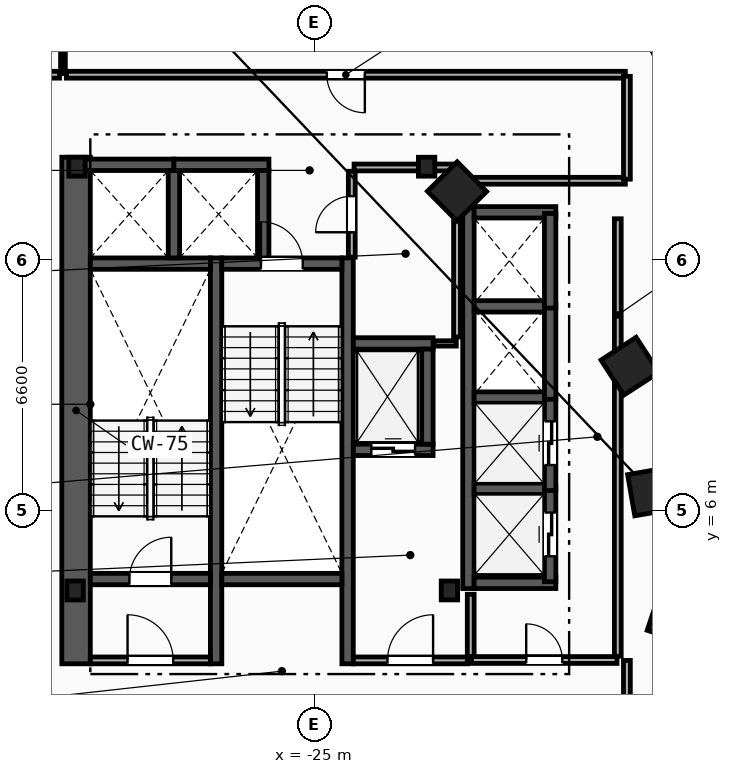
"""IFC4 building model, lengths in metres.
Left out: names, types, materials, properties, quantities, classifications, styles, units other than length and angle.
Written with IfcOpenShell. Run it as: python <this file> out.ifc"""

import sys

from ifc_helpers import new_model, si_unit, direction, frame, frame_2d, origin, origin_2d, place, context, subcontext, project, spatial, rectangle, i_section, extrude, element, fill, save


model = new_model("IFC4")
c1 = context("Model", 3, precision=1e-05, world=origin(), true_north=direction((0.0, 1.0)))
c2 = subcontext(c1, "Body", "Model", "MODEL_VIEW")
j1 = project(units=[si_unit("LENGTHUNIT", "METRE"), si_unit("PLANEANGLEUNIT", "RADIAN")], contexts=[c1])
p1 = place(None, origin())
s1 = spatial("IfcSite", under=j1, at=p1, CompositionType="ELEMENT")
p2 = place(p1, origin())
s2 = spatial("IfcBuilding", under=s1, at=p2, CompositionType="ELEMENT")
p3 = place(p2, frame((0.0, 0.0, 125.0)))
s3 = spatial("IfcBuildingStorey", under=s2, at=p3, CompositionType="ELEMENT", Elevation=125.0)
for number, where, z_axis, x_axis in (
    (1, (-31.3, 3.9, 0.0), (0.0, 0.0, 1.0), (1.0, 0.0, 0.0)),
    (2, (-21.45, 3.9, 0.0), (0.0, 0.0, 1.0), (1.0, 0.0, 0.0)),
    (3, (-22.05, 15.05, 0.0), (0.0, 0.0, 1.0), (1.0, 0.0, 0.0)),
    (4, (-31.25, 15.05, 0.0), (0.0, 0.0, 1.0), (1.0, 0.0, 0.0)),
):
    element("IfcColumn", number, at=place(p3, frame(where, z_axis=z_axis, x_axis=x_axis)), inside=s3, PredefinedType="COLUMN", context=c2, shape_type="SweptSolid", body=[
        extrude(i_section(OverallWidth=0.432, OverallDepth=0.498, WebThickness=0.056, FlangeThickness=0.089, FilletRadius=0.018, at=origin_2d()), origin(), (0.0, 0.0, 1.0), 3.6),
    ])
for number, where, z_axis, x_axis in (
    (5, (-15.55, 3.2, 0.0), (0.0, 0.0, 1.0), (0.315, 0.949, 0.0)),
    (6, (-16.125, 6.5, 0.0), (0.0, 0.0, 1.0), (-0.172, 0.985, 0.0)),
    (7, (-16.7, 9.8, 0.0), (0.0, 0.0, 1.0), (-0.544, 0.839, 0.0)),
    (8, (-21.25, 14.4, 0.0), (0.0, 0.0, 1.0), (-0.703, 0.711, 0.0)),
):
    element("IfcColumn", number, at=place(p3, frame(where, z_axis=z_axis, x_axis=x_axis)), inside=s3, PredefinedType="COLUMN", context=c2, shape_type="SweptSolid", body=[
        extrude(rectangle(XDim=1.1, YDim=1.1, at=origin_2d()), origin(), (0.0, 0.0, 1.0), 3.6),
    ])
p4 = place(p3, frame((-31.275, 1.97, 0.0), z_axis=(0.0, 0.0, 1.0), x_axis=(0.0, 1.0, 0.0)))
e9 = element("IfcWall", 9, at=p4, inside=s3, PredefinedType="SHEAR", context=c2, shape_type="SweptSolid", body=[
    extrude(rectangle(XDim=13.33, YDim=0.75, at=frame_2d((6.665, 0.0))), origin(), (0.0, 0.0, 1.0), 3.3),
])
for number, where, z_axis, x_axis in (
    (10, (-27.59, 1.97, 0.0), (0.0, 0.0, 1.0), (0.0, 1.0, 0.0)),
    (11, (-24.13, 1.97, 0.0), (0.0, 0.0, 1.0), (0.0, 1.0, 0.0)),
):
    element("IfcWall", number, at=place(p3, frame(where, z_axis=z_axis, x_axis=x_axis)), inside=s3, PredefinedType="SHEAR", context=c2, shape_type="SweptSolid", body=[
        extrude(rectangle(XDim=10.68, YDim=0.3, at=frame_2d((5.34, 0.0))), origin(), (0.0, 0.0, 1.0), 3.3),
    ])
p5 = place(p3, frame((-30.9, 4.2, 0.0), z_axis=(0.0, 0.0, 1.0), x_axis=(1.0, 0.0, 0.0)))
e12 = element("IfcWall", 12, at=p5, inside=s3, PredefinedType="SHEAR", context=c2, shape_type="SweptSolid", body=[
    extrude(rectangle(XDim=3.16, YDim=0.3, at=frame_2d((1.58, 0.0))), origin(), (0.0, 0.0, 1.0), 3.3),
])
p6 = place(p5, frame((1.03, 0.0, 0.0)))
e13 = element("IfcOpeningElement", 13, at=p6, cuts=e12, PredefinedType="OPENING", context=c2, shape_type="SweptSolid", body=[
    extrude(rectangle(XDim=1.1, YDim=2.15, at=frame_2d((0.55, 1.075))), frame((0.0, 0.16, 0.0), z_axis=(0.0, -1.0, 0.0), x_axis=(1.0, 0.0, 0.0)), (0.0, 0.0, 1.0), 0.32),
])
p7 = place(p3, frame((-30.9, 12.5, 0.0), z_axis=(0.0, 0.0, 1.0), x_axis=(1.0, 0.0, 0.0)))
e14 = element("IfcWall", 14, at=p7, inside=s3, PredefinedType="SHEAR", context=c2, shape_type="SweptSolid", body=[
    extrude(rectangle(XDim=3.16, YDim=0.3, at=frame_2d((1.58, 0.0))), origin(), (0.0, 0.0, 1.0), 3.3),
])
p8 = place(p3, frame((-27.44, 12.5, 0.0), z_axis=(0.0, 0.0, 1.0), x_axis=(1.0, 0.0, 0.0)))
e15 = element("IfcWall", 15, at=p8, inside=s3, PredefinedType="SHEAR", context=c2, shape_type="SweptSolid", body=[
    extrude(rectangle(XDim=3.16, YDim=0.3, at=frame_2d((1.58, 0.0))), origin(), (0.0, 0.0, 1.0), 3.3),
])
p9 = place(p8, frame((1.03, 0.0, 0.0)))
e16 = element("IfcOpeningElement", 16, at=p9, cuts=e15, PredefinedType="OPENING", context=c2, shape_type="SweptSolid", body=[
    extrude(rectangle(XDim=1.1, YDim=2.15, at=frame_2d((0.55, 1.075))), frame((0.0, 0.16, 0.0), z_axis=(0.0, -1.0, 0.0), x_axis=(1.0, 0.0, 0.0)), (0.0, 0.0, 1.0), 0.32),
])
p10 = place(p3, frame((-27.44, 4.2, 0.0), z_axis=(0.0, 0.0, 1.0), x_axis=(1.0, 0.0, 0.0)))
e17 = element("IfcWall", 17, at=p10, inside=s3, PredefinedType="SHEAR", context=c2, shape_type="SweptSolid", body=[
    extrude(rectangle(XDim=3.16, YDim=0.3, at=frame_2d((1.58, 0.0))), origin(), (0.0, 0.0, 1.0), 3.3),
])
p11 = place(p3, frame((-20.89, 2.15, 0.0), z_axis=(0.0, 0.0, 1.0), x_axis=(0.0, 1.0, 0.0)))
e18 = element("IfcWall", 18, at=p11, inside=s3, PredefinedType="PARTITIONING", context=c2, shape_type="SweptSolid", body=[
    extrude(rectangle(XDim=1.65, YDim=0.18, at=frame_2d((0.825, 0.0))), origin(), (0.0, 0.0, 1.0), 3.3),
])
p12 = place(p3, frame((-23.98, 2.06, 0.0), z_axis=(0.0, 0.0, 1.0), x_axis=(1.0, 0.0, 0.0)))
e19 = element("IfcWall", 19, at=p12, inside=s3, PredefinedType="PARTITIONING", context=c2, shape_type="SweptSolid", body=[
    extrude(rectangle(XDim=3.0, YDim=0.18, at=frame_2d((1.5, 0.0))), origin(), (0.0, 0.0, 1.0), 3.3),
])
p13 = place(p12, frame((0.9, 0.0, 0.0)))
e20 = element("IfcOpeningElement", 20, at=p13, cuts=e19, PredefinedType="OPENING", context=c2, shape_type="SweptSolid", body=[
    extrude(rectangle(XDim=1.2, YDim=2.15, at=frame_2d((0.6, 1.075))), frame((0.0, 0.1, 0.0), z_axis=(0.0, -1.0, 0.0), x_axis=(1.0, 0.0, 0.0)), (0.0, 0.0, 1.0), 0.2),
])
p14 = place(p3, frame((-30.9, 2.06, 0.0), z_axis=(0.0, 0.0, 1.0), x_axis=(1.0, 0.0, 0.0)))
e21 = element("IfcWall", 21, at=p14, inside=s3, PredefinedType="PARTITIONING", context=c2, shape_type="SweptSolid", body=[
    extrude(rectangle(XDim=3.16, YDim=0.18, at=frame_2d((1.58, 0.0))), origin(), (0.0, 0.0, 1.0), 3.3),
])
p15 = place(p14, frame((0.98, 0.0, 0.0)))
e22 = element("IfcOpeningElement", 22, at=p15, cuts=e21, PredefinedType="OPENING", context=c2, shape_type="SweptSolid", body=[
    extrude(rectangle(XDim=1.2, YDim=2.15, at=frame_2d((0.6, 1.075))), frame((0.0, 0.1, 0.0), z_axis=(0.0, -1.0, 0.0), x_axis=(1.0, 0.0, 0.0)), (0.0, 0.0, 1.0), 0.2),
])
p16 = place(p3, frame((-23.98, 7.6, 0.0), z_axis=(0.0, 0.0, 1.0), x_axis=(1.0, 0.0, 0.0)))
e23 = element("IfcWall", 23, at=p16, inside=s3, PredefinedType="SHEAR", context=c2, shape_type="SweptSolid", body=[
    extrude(rectangle(XDim=2.1, YDim=0.3, at=frame_2d((1.05, 0.0))), origin(), (0.0, 0.0, 1.0), 3.3),
])
p17 = place(p16, frame((0.475, 0.0, 0.0)))
e24 = element("IfcOpeningElement", 24, at=p17, cuts=e23, PredefinedType="OPENING", context=c2, shape_type="SweptSolid", body=[
    extrude(rectangle(XDim=1.15, YDim=2.2, at=frame_2d((0.575, 1.1))), frame((0.0, 0.16, 0.0), z_axis=(0.0, -1.0, 0.0), x_axis=(1.0, 0.0, 0.0)), (0.0, 0.0, 1.0), 0.32),
])
p18 = place(p3, frame((-23.98, 10.4, 0.0), z_axis=(0.0, 0.0, 1.0), x_axis=(1.0, 0.0, 0.0)))
e25 = element("IfcWall", 25, at=p18, inside=s3, PredefinedType="SHEAR", context=c2, shape_type="SweptSolid", body=[
    extrude(rectangle(XDim=2.1, YDim=0.3, at=frame_2d((1.05, 0.0))), origin(), (0.0, 0.0, 1.0), 3.3),
])
for number, where, z_axis, x_axis in (
    (26, (-22.03, 7.75, 0.0), (0.0, 0.0, 1.0), (0.0, 1.0, 0.0)),
    (27, (-31.2, 15.1, 0.0), (0.0, 0.0, 1.0), (1.0, 0.0, 0.0)),
):
    element("IfcWall", number, at=place(p3, frame(where, z_axis=z_axis, x_axis=x_axis)), inside=s3, PredefinedType="SHEAR", context=c2, shape_type="SweptSolid", body=[
        extrude(rectangle(XDim=2.5, YDim=0.3, at=frame_2d((1.25, 0.0))), origin(), (0.0, 0.0, 1.0), 3.3),
    ])
p19 = place(p3, frame((-28.7, 12.65, 0.0), z_axis=(0.0, 0.0, 1.0), x_axis=(0.0, 1.0, 0.0)))
e28 = element("IfcWall", 28, at=p19, inside=s3, PredefinedType="SHEAR", context=c2, shape_type="SweptSolid", body=[
    extrude(rectangle(XDim=2.3, YDim=0.3, at=frame_2d((1.15, 0.0))), origin(), (0.0, 0.0, 1.0), 3.3),
])
p20 = place(p3, frame((-28.7, 15.1, 0.0), z_axis=(0.0, 0.0, 1.0), x_axis=(1.0, 0.0, 0.0)))
e29 = element("IfcWall", 29, at=p20, inside=s3, PredefinedType="SHEAR", context=c2, shape_type="SweptSolid", body=[
    extrude(rectangle(XDim=2.5, YDim=0.3, at=frame_2d((1.25, 0.0))), origin(), (0.0, 0.0, 1.0), 3.3),
])
p21 = place(p3, frame((-26.35, 12.65, 0.0), z_axis=(0.0, 0.0, 1.0), x_axis=(0.0, 1.0, 0.0)))
e30 = element("IfcWall", 30, at=p21, inside=s3, PredefinedType="SHEAR", context=c2, shape_type="SweptSolid", body=[
    extrude(rectangle(XDim=2.3, YDim=0.3, at=frame_2d((1.15, 0.0))), origin(), (0.0, 0.0, 1.0), 3.3),
])
p22 = place(p3, frame((-20.95, 3.95, 0.0), z_axis=(0.0, 0.0, 1.0), x_axis=(0.0, 1.0, 0.0)))
e31 = element("IfcWall", 31, at=p22, inside=s3, PredefinedType="SHEAR", context=c2, shape_type="SweptSolid", body=[
    extrude(rectangle(XDim=10.05, YDim=0.3, at=frame_2d((5.025, 0.0))), origin(), (0.0, 0.0, 1.0), 3.3),
])
for number, where, z_axis, x_axis in (
    (32, (-20.8, 4.1, 0.0), (0.0, 0.0, 1.0), (1.0, 0.0, 0.0)),
    (33, (-20.8, 13.85, 0.0), (0.0, 0.0, 1.0), (1.0, 0.0, 0.0)),
):
    element("IfcWall", number, at=place(p3, frame(where, z_axis=z_axis, x_axis=x_axis)), inside=s3, PredefinedType="SHEAR", context=c2, shape_type="SweptSolid", body=[
        extrude(rectangle(XDim=2.15, YDim=0.3, at=frame_2d((1.075, 0.0))), origin(), (0.0, 0.0, 1.0), 3.3),
    ])
for number, where, z_axis, x_axis in (
    (34, (-20.8, 6.575, 0.0), (0.0, 0.0, 1.0), (1.0, 0.0, 0.0)),
    (35, (-20.8, 8.975, 0.0), (0.0, 0.0, 1.0), (1.0, 0.0, 0.0)),
    (36, (-20.8, 11.375, 0.0), (0.0, 0.0, 1.0), (1.0, 0.0, 0.0)),
):
    element("IfcWall", number, at=place(p3, frame(where, z_axis=z_axis, x_axis=x_axis)), inside=s3, PredefinedType="SHEAR", context=c2, shape_type="SweptSolid", body=[
        extrude(rectangle(XDim=1.85, YDim=0.3, at=frame_2d((0.925, 0.0))), origin(), (0.0, 0.0, 1.0), 3.3),
    ])
p23 = place(p3, frame((-18.8, 4.13, 0.0), z_axis=(0.0, 0.0, 1.0), x_axis=(0.0, 1.0, 0.0)))
e37 = element("IfcWall", 37, at=p23, inside=s3, PredefinedType="SHEAR", context=c2, shape_type="SweptSolid", body=[
    extrude(rectangle(XDim=2.49, YDim=0.3, at=frame_2d((1.245, 0.0))), origin(), (0.0, 0.0, 1.0), 3.3),
])
p24 = place(p23, frame((0.67, 0.0, 0.0)))
e38 = element("IfcOpeningElement", 38, at=p24, cuts=e37, PredefinedType="OPENING", context=c2, shape_type="SweptSolid", body=[
    extrude(rectangle(XDim=1.15, YDim=2.2, at=frame_2d((0.575, 1.1))), frame((0.0, 0.16, 0.0), z_axis=(0.0, -1.0, 0.0), x_axis=(1.0, 0.0, 0.0)), (0.0, 0.0, 1.0), 0.32),
])
p25 = place(p3, frame((-18.8, 6.53, 0.0), z_axis=(0.0, 0.0, 1.0), x_axis=(0.0, 1.0, 0.0)))
e39 = element("IfcWall", 39, at=p25, inside=s3, PredefinedType="SHEAR", context=c2, shape_type="SweptSolid", body=[
    extrude(rectangle(XDim=2.49, YDim=0.3, at=frame_2d((1.245, 0.0))), origin(), (0.0, 0.0, 1.0), 3.3),
])
p26 = place(p25, frame((0.67, 0.0, 0.0)))
e40 = element("IfcOpeningElement", 40, at=p26, cuts=e39, PredefinedType="OPENING", context=c2, shape_type="SweptSolid", body=[
    extrude(rectangle(XDim=1.15, YDim=2.2, at=frame_2d((0.575, 1.1))), frame((0.0, 0.16, 0.0), z_axis=(0.0, -1.0, 0.0), x_axis=(1.0, 0.0, 0.0)), (0.0, 0.0, 1.0), 0.32),
])
for number, where, z_axis, x_axis in (
    (41, (-18.8, 8.93, 0.0), (0.0, 0.0, 1.0), (0.0, 1.0, 0.0)),
    (42, (-18.8, 11.33, 0.0), (0.0, 0.0, 1.0), (0.0, 1.0, 0.0)),
):
    element("IfcWall", number, at=place(p3, frame(where, z_axis=z_axis, x_axis=x_axis)), inside=s3, PredefinedType="SHEAR", context=c2, shape_type="SweptSolid", body=[
        extrude(rectangle(XDim=2.49, YDim=0.3, at=frame_2d((1.245, 0.0))), origin(), (0.0, 0.0, 1.0), 3.3),
    ])
p27 = place(p3, frame((-17.02, 2.17, 0.0), z_axis=(0.0, 0.0, 1.0), x_axis=(0.0, 1.0, 0.0)))
e43 = element("IfcWall", 43, at=p27, inside=s3, PredefinedType="PARTITIONING", context=c2, shape_type="SweptSolid", body=[
    extrude(rectangle(XDim=11.51, YDim=0.18, at=frame_2d((5.755, 0.0))), origin(), (0.0, 0.0, 1.0), 3.3),
])
p28 = place(p3, frame((-20.87, 2.07, 0.0), z_axis=(0.0, 0.0, 1.0), x_axis=(1.0, 0.0, 0.0)))
e44 = element("IfcWall", 44, at=p28, inside=s3, PredefinedType="PARTITIONING", context=c2, shape_type="SweptSolid", body=[
    extrude(rectangle(XDim=3.83, YDim=0.18, at=frame_2d((1.915, 0.0))), origin(), (0.0, 0.0, 1.0), 3.3),
])
p29 = place(p28, frame((1.44, 0.0, 0.0)))
e45 = element("IfcOpeningElement", 45, at=p29, cuts=e44, PredefinedType="OPENING", context=c2, shape_type="SweptSolid", body=[
    extrude(rectangle(XDim=0.95, YDim=2.1, at=frame_2d((0.475, 1.05))), frame((0.0, 0.1, 0.0), z_axis=(0.0, -1.0, 0.0), x_axis=(1.0, 0.0, 0.0)), (0.0, 0.0, 1.0), 0.2),
])
p30 = place(p3, frame((-21.86, 10.4, 0.0), z_axis=(0.0, 0.0, 1.0), x_axis=(1.0, 0.0, 0.0)))
e46 = element("IfcWall", 46, at=p30, inside=s3, PredefinedType="PARTITIONING", context=c2, shape_type="SweptSolid", body=[
    extrude(rectangle(XDim=0.59, YDim=0.14, at=frame_2d((0.295, 0.0))), origin(), (0.0, 0.0, 1.0), 3.3),
])
p31 = place(p3, frame((-21.25, 10.57, 0.0), z_axis=(0.0, 0.0, 1.0), x_axis=(0.0, 1.0, 0.0)))
e47 = element("IfcWall", 47, at=p31, inside=s3, PredefinedType="PARTITIONING", context=c2, shape_type="SweptSolid", body=[
    extrude(rectangle(XDim=4.36, YDim=0.18, at=frame_2d((2.18, 0.0))), origin(), (0.0, 0.0, 1.0), 3.3),
])
p32 = place(p3, frame((-23.96, 15.03, 0.0), z_axis=(0.0, 0.0, 1.0), x_axis=(1.0, 0.0, 0.0)))
e48 = element("IfcWall", 48, at=p32, inside=s3, PredefinedType="PARTITIONING", context=c2, shape_type="SweptSolid", body=[
    extrude(rectangle(XDim=2.61, YDim=0.18, at=frame_2d((1.305, 0.0))), origin(), (0.0, 0.0, 1.0), 2.373),
])
p33 = place(p3, frame((-24.02, 12.67, 0.0), z_axis=(0.0, 0.0, 1.0), x_axis=(0.0, 1.0, 0.0)))
e49 = element("IfcWall", 49, at=p33, inside=s3, PredefinedType="PARTITIONING", context=c2, shape_type="SweptSolid", body=[
    extrude(rectangle(XDim=2.26, YDim=0.18, at=frame_2d((1.13, 0.0))), origin(), (0.0, 0.0, 1.0), 3.3),
])
p34 = place(p33, frame((0.655, 0.0, 0.0)))
e50 = element("IfcOpeningElement", 50, at=p34, cuts=e49, PredefinedType="OPENING", context=c2, shape_type="SweptSolid", body=[
    extrude(rectangle(XDim=0.95, YDim=2.1, at=frame_2d((0.475, 1.05))), frame((0.0, 0.1, 0.0), z_axis=(0.0, -1.0, 0.0), x_axis=(1.0, 0.0, 0.0)), (0.0, 0.0, 1.0), 0.2),
])
p35 = place(p3, frame((-31.62, 17.5, 0.0), z_axis=(0.0, 0.0, 1.0), x_axis=(0.0, 1.0, 0.0)))
e51 = element("IfcWall", 51, at=p35, inside=s3, PredefinedType="PARTITIONING", context=c2, shape_type="SweptSolid", body=[
    extrude(rectangle(XDim=8.485, YDim=0.125, at=frame_2d((4.243, 0.0))), origin(), (0.0, 0.0, 1.0), 3.3),
])
p36 = place(p3, frame((-16.822, 17.47, 0.0), z_axis=(0.0, 0.0, 1.0), x_axis=(-1.0, 0.0, 0.0)))
e52 = element("IfcWall", 52, at=p36, inside=s3, PredefinedType="PARTITIONING", context=c2, shape_type="SweptSolid", body=[
    extrude(rectangle(XDim=14.708, YDim=0.18, at=frame_2d((7.354, 0.0))), origin(), (0.0, 0.0, 1.0), 3.3),
])
p37 = place(p36, frame((6.854, 0.0, 0.0)))
e53 = element("IfcOpeningElement", 53, at=p37, cuts=e52, PredefinedType="OPENING", context=c2, shape_type="SweptSolid", body=[
    extrude(rectangle(XDim=1.0, YDim=2.15, at=frame_2d((0.5, 1.075))), frame((0.0, 0.1, 0.0), z_axis=(0.0, -1.0, 0.0), x_axis=(1.0, 0.0, 0.0)), (0.0, 0.0, 1.0), 0.2),
])
p38 = place(p3, frame((-21.178, 14.68, 0.0), z_axis=(0.0, 0.0, 1.0), x_axis=(1.0, 0.0, 0.0)))
e54 = element("IfcWall", 54, at=p38, inside=s3, PredefinedType="PARTITIONING", context=c2, shape_type="SweptSolid", body=[
    extrude(rectangle(XDim=4.357, YDim=0.18, at=frame_2d((2.178, 0.0))), origin(), (0.0, 0.0, 1.0), 3.3),
])
p39 = place(p3, frame((-16.78, 14.721, 0.0), z_axis=(0.0, 0.0, 1.0), x_axis=(0.0, 1.0, 0.0)))
e55 = element("IfcWall", 55, at=p39, inside=s3, PredefinedType="PARTITIONING", context=c2, shape_type="SweptSolid", body=[
    extrude(rectangle(XDim=2.707, YDim=0.18, at=frame_2d((1.354, 0.0))), origin(), (0.0, 0.0, 1.0), 3.3),
])
p40 = place(p3, frame((-16.78, -0.329, 0.0), z_axis=(0.0, 0.0, 1.0), x_axis=(0.0, 1.0, 0.0)))
e56 = element("IfcWall", 56, at=p40, inside=s3, PredefinedType="PARTITIONING", context=c2, shape_type="SweptSolid", body=[
    extrude(rectangle(XDim=2.387, YDim=0.18, at=frame_2d((1.194, 0.0))), origin(), (0.0, 0.0, 1.0), 3.3),
])
p41 = place(p3, frame((-31.71, 17.47, 0.0), z_axis=(0.0, 0.0, 1.0), x_axis=(-1.0, 0.0, 0.0)))
e57 = element("IfcWall", 57, at=p41, inside=s3, PredefinedType="PARTITIONING", context=c2, shape_type="SweptSolid", body=[
    extrude(rectangle(XDim=1.918, YDim=0.18, at=frame_2d((0.959, 0.0))), origin(), (0.0, 0.0, 1.0), 3.3),
])
p42 = place(p6, origin())
e58 = element("IfcDoor", 58, at=p42, inside=s3, OperationType="SINGLE_SWING_RIGHT", PredefinedType="DOOR", context=c2, shape_type="SweptSolid", body=[
    extrude(rectangle(XDim=1.1, YDim=2.15, at=frame_2d((0.55, 1.075))), frame((0.0, 0.025, 0.0), z_axis=(0.0, -1.0, 0.0), x_axis=(1.0, 0.0, 0.0)), (0.0, 0.0, 1.0), 0.05),
])
fill(e13, e58)
p43 = place(p9, origin())
e59 = element("IfcDoor", 59, at=p43, inside=s3, OperationType="SINGLE_SWING_LEFT", PredefinedType="DOOR", context=c2, shape_type="SweptSolid", body=[
    extrude(rectangle(XDim=1.1, YDim=2.15, at=frame_2d((0.55, 1.075))), frame((0.0, 0.025, 0.0), z_axis=(0.0, -1.0, 0.0), x_axis=(1.0, 0.0, 0.0)), (0.0, 0.0, 1.0), 0.05),
])
fill(e16, e59)
p44 = place(p13, origin())
e60 = element("IfcDoor", 60, at=p44, inside=s3, OperationType="SINGLE_SWING_RIGHT", PredefinedType="DOOR", context=c2, shape_type="SweptSolid", body=[
    extrude(rectangle(XDim=1.2, YDim=2.15, at=frame_2d((0.6, 1.075))), frame((0.0, 0.025, 0.0), z_axis=(0.0, -1.0, 0.0), x_axis=(1.0, 0.0, 0.0)), (0.0, 0.0, 1.0), 0.05),
])
fill(e20, e60)
p45 = place(p15, origin())
e61 = element("IfcDoor", 61, at=p45, inside=s3, OperationType="SINGLE_SWING_LEFT", PredefinedType="DOOR", context=c2, shape_type="SweptSolid", body=[
    extrude(rectangle(XDim=1.2, YDim=2.15, at=frame_2d((0.6, 1.075))), frame((0.0, 0.025, 0.0), z_axis=(0.0, -1.0, 0.0), x_axis=(1.0, 0.0, 0.0)), (0.0, 0.0, 1.0), 0.05),
])
fill(e22, e61)
p46 = place(p17, origin())
e62 = element("IfcDoor", 62, at=p46, inside=s3, OperationType="SLIDING_TO_LEFT", PredefinedType="TRAPDOOR", context=c2, shape_type="SweptSolid", body=[
    extrude(rectangle(XDim=1.15, YDim=2.2, at=frame_2d((0.575, 1.1))), frame((0.0, 0.025, 0.0), z_axis=(0.0, -1.0, 0.0), x_axis=(1.0, 0.0, 0.0)), (0.0, 0.0, 1.0), 0.05),
])
fill(e24, e62)
p47 = place(p24, origin())
e63 = element("IfcDoor", 63, at=p47, inside=s3, OperationType="SLIDING_TO_LEFT", PredefinedType="TRAPDOOR", context=c2, shape_type="SweptSolid", body=[
    extrude(rectangle(XDim=1.15, YDim=2.2, at=frame_2d((0.575, 1.1))), frame((0.0, 0.025, 0.0), z_axis=(0.0, -1.0, 0.0), x_axis=(1.0, 0.0, 0.0)), (0.0, 0.0, 1.0), 0.05),
])
fill(e38, e63)
p48 = place(p26, origin())
e64 = element("IfcDoor", 64, at=p48, inside=s3, OperationType="SLIDING_TO_LEFT", PredefinedType="TRAPDOOR", context=c2, shape_type="SweptSolid", body=[
    extrude(rectangle(XDim=1.15, YDim=2.2, at=frame_2d((0.575, 1.1))), frame((0.0, 0.025, 0.0), z_axis=(0.0, -1.0, 0.0), x_axis=(1.0, 0.0, 0.0)), (0.0, 0.0, 1.0), 0.05),
])
fill(e40, e64)
p49 = place(p37, origin())
e65 = element("IfcDoor", 65, at=p49, inside=s3, OperationType="SINGLE_SWING_LEFT", PredefinedType="DOOR", context=c2, shape_type="SweptSolid", body=[
    extrude(rectangle(XDim=1.0, YDim=2.15, at=frame_2d((0.5, 1.075))), frame((0.0, 0.025, 0.0), z_axis=(0.0, -1.0, 0.0), x_axis=(1.0, 0.0, 0.0)), (0.0, 0.0, 1.0), 0.05),
])
fill(e53, e65)
p50 = place(p29, origin())
e66 = element("IfcDoor", 66, at=p50, inside=s3, OperationType="SINGLE_SWING_LEFT", PredefinedType="DOOR", context=c2, shape_type="SweptSolid", body=[
    extrude(rectangle(XDim=0.95, YDim=2.1, at=frame_2d((0.475, 1.05))), frame((0.0, 0.025, 0.0), z_axis=(0.0, -1.0, 0.0), x_axis=(1.0, 0.0, 0.0)), (0.0, 0.0, 1.0), 0.05),
])
fill(e45, e66)
p51 = place(p34, origin())
e67 = element("IfcDoor", 67, at=p51, inside=s3, OperationType="SINGLE_SWING_LEFT", PredefinedType="DOOR", context=c2, shape_type="SweptSolid", body=[
    extrude(rectangle(XDim=0.95, YDim=2.1, at=frame_2d((0.475, 1.05))), frame((0.0, 0.025, 0.0), z_axis=(0.0, -1.0, 0.0), x_axis=(1.0, 0.0, 0.0)), (0.0, 0.0, 1.0), 0.05),
])
fill(e50, e67)
save(model, sys.argv[1])
